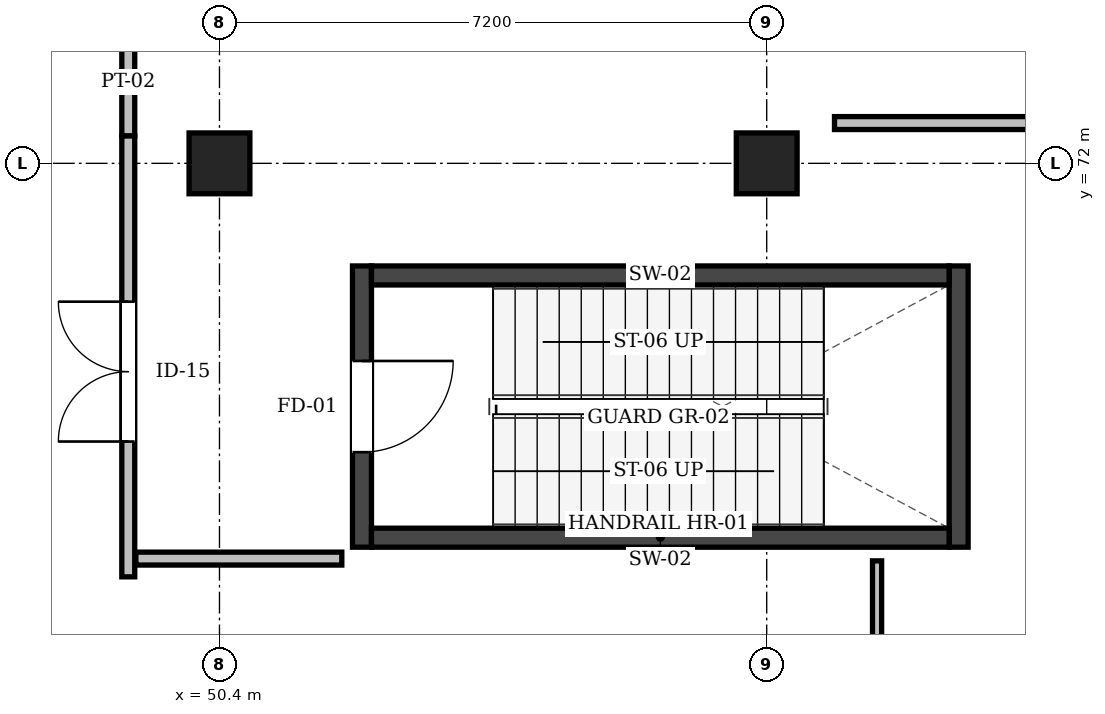
"""IFC4 building model, lengths in metres.
Left out: names, types, materials, properties, quantities, classifications, styles, units other than length and angle.
Written with IfcOpenShell. Run it as: python <this file> out.ifc"""

import sys

from ifc_helpers import new_model, si_unit, direction, frame, frame_2d, origin, origin_2d, place, context, subcontext, project, spatial, rectangle, extrude, element, fill, save


model = new_model("IFC4")
c1 = context("Model", 3, precision=1e-05, world=origin(), true_north=direction((0.0, 1.0)))
c2 = subcontext(c1, "Body", "Model", "MODEL_VIEW")
j1 = project(units=[si_unit("LENGTHUNIT", "METRE"), si_unit("PLANEANGLEUNIT", "RADIAN")], contexts=[c1])
p1 = place(None, origin())
s1 = spatial("IfcSite", under=j1, at=p1, CompositionType="ELEMENT")
p2 = place(p1, origin())
s2 = spatial("IfcBuilding", under=s1, at=p2, CompositionType="ELEMENT")
p3 = place(p2, frame((0.0, 0.0, 9.6)))
s3 = spatial("IfcBuildingStorey", under=s2, at=p3, CompositionType="ELEMENT", Elevation=9.6)
for number, where, z_axis, x_axis in (
    (1, (50.4, 72.0, 0.0), (0.0, 0.0, 1.0), (1.0, 0.0, 0.0)),
    (2, (57.6, 72.0, 0.0), (0.0, 0.0, 1.0), (1.0, 0.0, 0.0)),
):
    element("IfcColumn", number, at=place(p3, frame(where, z_axis=z_axis, x_axis=x_axis)), inside=s3, PredefinedType="COLUMN", context=c2, shape_type="SweptSolid", body=[
        extrude(rectangle(XDim=0.8, YDim=0.8, at=origin_2d()), origin(), (0.0, 0.0, 1.0), 4.8),
    ])
p4 = place(p3, frame((52.275, 66.95, 0.0), z_axis=(0.0, 0.0, 1.0), x_axis=(0.0, 1.0, 0.0)))
e3 = element("IfcWall", 3, at=p4, inside=s3, PredefinedType="SHEAR", context=c2, shape_type="SweptSolid", body=[
    extrude(rectangle(XDim=3.7, YDim=0.25, at=frame_2d((1.85, 0.0))), origin(), (0.0, 0.0, 1.0), 4.55),
])
p5 = place(p4, frame((1.25, 0.0, 0.0)))
e4 = element("IfcOpeningElement", 4, at=p5, cuts=e3, PredefinedType="OPENING", context=c2, shape_type="SweptSolid", body=[
    extrude(rectangle(XDim=1.2, YDim=2.15, at=frame_2d((0.6, 1.075))), frame((0.0, 0.137, 0.0), z_axis=(0.0, -1.0, 0.0), x_axis=(1.0, 0.0, 0.0)), (0.0, 0.0, 1.0), 0.274),
])
p6 = place(p3, frame((60.125, 66.95, 0.0), z_axis=(0.0, 0.0, 1.0), x_axis=(0.0, 1.0, 0.0)))
e5 = element("IfcWall", 5, at=p6, inside=s3, PredefinedType="SHEAR", context=c2, shape_type="SweptSolid", body=[
    extrude(rectangle(XDim=3.7, YDim=0.25, at=frame_2d((1.85, 0.0))), origin(), (0.0, 0.0, 1.0), 4.55),
])
for number, where, z_axis, x_axis in (
    (6, (52.4, 67.075, 0.0), (0.0, 0.0, 1.0), (1.0, 0.0, 0.0)),
    (7, (52.4, 70.525, 0.0), (0.0, 0.0, 1.0), (1.0, 0.0, 0.0)),
):
    element("IfcWall", number, at=place(p3, frame(where, z_axis=z_axis, x_axis=x_axis)), inside=s3, PredefinedType="SHEAR", context=c2, shape_type="SweptSolid", body=[
        extrude(rectangle(XDim=7.6, YDim=0.25, at=frame_2d((3.8, 0.0))), origin(), (0.0, 0.0, 1.0), 4.55),
    ])
p7 = place(p3, frame((49.2, 72.36, 0.0), z_axis=(0.0, 0.0, 1.0), x_axis=(0.0, 1.0, 0.0)))
e8 = element("IfcWall", 8, at=p7, inside=s3, PredefinedType="PARTITIONING", context=c2, shape_type="SweptSolid", body=[
    extrude(rectangle(XDim=2.94, YDim=0.17, at=frame_2d((1.47, 0.0))), origin(), (0.0, 0.0, 1.0), 4.46),
])
p8 = place(p3, frame((58.492, 72.53, 0.0), z_axis=(0.0, 0.0, 1.0), x_axis=(1.0, 0.0, 0.0)))
e9 = element("IfcWall", 9, at=p8, inside=s3, PredefinedType="PARTITIONING", context=c2, shape_type="SweptSolid", body=[
    extrude(rectangle(XDim=23.138, YDim=0.17, at=frame_2d((11.569, 0.0))), origin(), (0.0, 0.0, 1.0), 4.46),
])
p9 = place(p8, frame((10.479, 0.0, 0.0)))
e10 = element("IfcOpeningElement", 10, at=p9, cuts=e9, PredefinedType="OPENING", context=c2, shape_type="SweptSolid", body=[
    extrude(rectangle(XDim=0.98, YDim=2.14, at=frame_2d((0.49, 1.07))), frame((0.0, 0.097, 0.0), z_axis=(0.0, -1.0, 0.0), x_axis=(1.0, 0.0, 0.0)), (0.0, 0.0, 1.0), 0.194),
])
p10 = place(p3, frame((49.2, 66.56, 0.0), z_axis=(0.0, 0.0, 1.0), x_axis=(0.0, 1.0, 0.0)))
e11 = element("IfcWall", 11, at=p10, inside=s3, PredefinedType="PARTITIONING", context=c2, shape_type="SweptSolid", body=[
    extrude(rectangle(XDim=5.8, YDim=0.17, at=frame_2d((2.9, 0.0))), origin(), (0.0, 0.0, 1.0), 4.46),
])
p11 = place(p10, frame((1.78, 0.0, 0.0)))
e12 = element("IfcOpeningElement", 12, at=p11, cuts=e11, PredefinedType="OPENING", context=c2, shape_type="SweptSolid", body=[
    extrude(rectangle(XDim=1.84, YDim=2.3, at=frame_2d((0.92, 1.15))), frame((0.0, 0.097, 0.0), z_axis=(0.0, -1.0, 0.0), x_axis=(1.0, 0.0, 0.0)), (0.0, 0.0, 1.0), 0.194),
])
p12 = place(p3, frame((49.3, 66.8, 0.0), z_axis=(0.0, 0.0, 1.0), x_axis=(1.0, 0.0, 0.0)))
e13 = element("IfcWall", 13, at=p12, inside=s3, PredefinedType="PARTITIONING", context=c2, shape_type="SweptSolid", body=[
    extrude(rectangle(XDim=2.71, YDim=0.17, at=frame_2d((1.355, 0.0))), origin(), (0.0, 0.0, 1.0), 4.46),
])
p13 = place(p3, frame((59.052, 64.922, 0.0), z_axis=(0.0, 0.0, 1.0), x_axis=(0.0, 1.0, 0.0)))
e14 = element("IfcWall", 14, at=p13, inside=s3, PredefinedType="PARTITIONING", context=c2, shape_type="SweptSolid", body=[
    extrude(rectangle(XDim=1.848, YDim=0.12, at=frame_2d((0.924, 0.0))), origin(), (0.0, 0.0, 1.0), 4.46),
])
p14 = place(p5, frame((1.2, 0.0, 0.0), z_axis=(0.0, 0.0, 1.0), x_axis=(-1.0, 0.0, 0.0)))
e15 = element("IfcDoor", 15, at=p14, inside=s3, OperationType="SINGLE_SWING_LEFT", PredefinedType="DOOR", context=c2, shape_type="SweptSolid", body=[
    extrude(rectangle(XDim=1.2, YDim=2.15, at=frame_2d((0.6, 1.075))), frame((0.0, 0.025, 0.0), z_axis=(0.0, -1.0, 0.0), x_axis=(1.0, 0.0, 0.0)), (0.0, 0.0, 1.0), 0.05),
])
fill(e4, e15)
p15 = place(p11, origin())
e16 = element("IfcDoor", 16, at=p15, inside=s3, OperationType="DOUBLE_DOOR_SINGLE_SWING", PredefinedType="DOOR", context=c2, shape_type="SweptSolid", body=[
    extrude(rectangle(XDim=1.84, YDim=2.3, at=frame_2d((0.92, 1.15))), frame((0.0, 0.025, 0.0), z_axis=(0.0, -1.0, 0.0), x_axis=(1.0, 0.0, 0.0)), (0.0, 0.0, 1.0), 0.05),
])
fill(e12, e16)
save(model, sys.argv[1])
